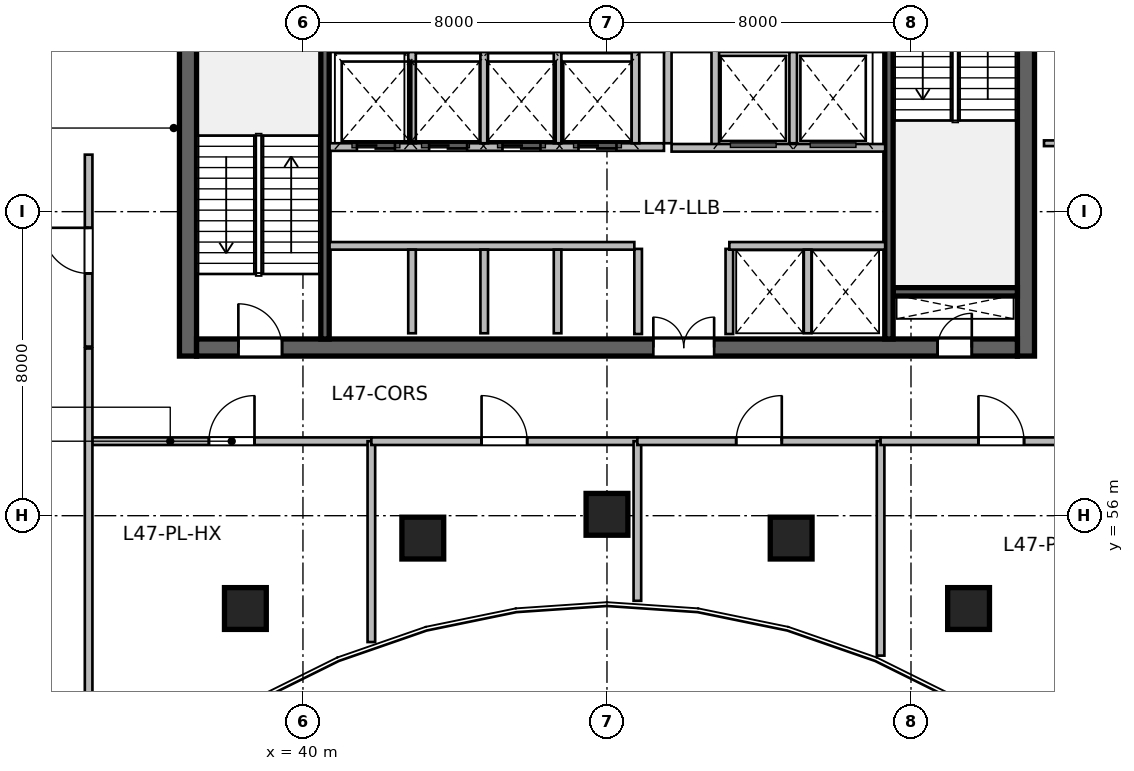
"""IFC4 building model, lengths in metres.
Left out: names, types, materials, properties, quantities, classifications, styles, units other than length and angle.
Written with IfcOpenShell. Run it as: python <this file> out.ifc"""

import sys

from ifc_helpers import new_model, si_unit, direction, frame, frame_2d, origin, origin_2d, place, context, subcontext, project, spatial, rectangle, circle, extrude, source, transform, mapped, element, fill, save


model = new_model("IFC4")
c1 = context("Model", 3, precision=1e-05, world=origin(), true_north=direction((0.0, 1.0)))
c2 = subcontext(c1, "Body", "Model", "MODEL_VIEW")
j1 = project(units=[si_unit("LENGTHUNIT", "METRE"), si_unit("PLANEANGLEUNIT", "RADIAN")], contexts=[c1])
p1 = place(None, origin())
s1 = spatial("IfcSite", under=j1, at=p1, CompositionType="ELEMENT")
p2 = place(p1, origin())
s2 = spatial("IfcBuilding", under=s1, at=p2, CompositionType="ELEMENT")
p3 = place(p2, frame((0.0, 0.0, 194.4)))
s3 = spatial("IfcBuildingStorey", under=s2, at=p3, CompositionType="ELEMENT", Elevation=194.4)
m1 = source(origin(), c2, "Body", "SweptSolid", [
    extrude(rectangle(XDim=12.0, YDim=0.45, at=frame_2d((6.0, 0.0))), origin(), (0.0, 0.0, 1.0), 4.8),
])
for number, where, z_axis, x_axis in (
    (1, (36.975, 60.2, 0.0), (0.0, 0.0, 1.0), (0.0, 1.0, 0.0)),
    (2, (59.025, 60.2, 0.0), (0.0, 0.0, 1.0), (0.0, 1.0, 0.0)),
):
    element("IfcWall", number, at=place(p3, frame(where, z_axis=z_axis, x_axis=x_axis)), inside=s3, PredefinedType="SHEAR", context=c2, shape_type="MappedRepresentation", body=[
        mapped(m1, transform((0.0, 0.0, 0.0), scale=1.0)),
    ])
m2 = source(origin(), c2, "Body", "SweptSolid", [
    extrude(rectangle(XDim=21.6, YDim=0.45, at=frame_2d((10.8, 0.0))), origin(), (0.0, 0.0, 1.0), 4.8),
])
p4 = place(p3, frame((37.2, 60.425, 0.0), z_axis=(0.0, 0.0, 1.0), x_axis=(1.0, 0.0, 0.0)))
e3 = element("IfcWall", 3, at=p4, inside=s3, PredefinedType="SHEAR", context=c2, shape_type="MappedRepresentation", body=[
    mapped(m2, transform((0.0, 0.0, 0.0), scale=1.0)),
])
p5 = place(p4, frame((1.1, 0.0, 0.0)))
e4 = element("IfcOpeningElement", 4, at=p5, cuts=e3, PredefinedType="OPENING", context=c2, shape_type="SweptSolid", body=[
    extrude(rectangle(XDim=1.15, YDim=2.15, at=frame_2d((0.575, 1.075))), frame((0.0, 0.235, 0.0), z_axis=(0.0, -1.0, 0.0), x_axis=(1.0, 0.0, 0.0)), (0.0, 0.0, 1.0), 0.47),
])
p6 = place(p4, frame((19.5, 0.0, 0.0)))
e5 = element("IfcOpeningElement", 5, at=p6, cuts=e3, PredefinedType="OPENING", context=c2, shape_type="SweptSolid", body=[
    extrude(rectangle(XDim=0.9, YDim=2.1, at=frame_2d((0.45, 1.05))), frame((0.0, 0.235, 0.0), z_axis=(0.0, -1.0, 0.0), x_axis=(1.0, 0.0, 0.0)), (0.0, 0.0, 1.0), 0.47),
])
p7 = place(p4, frame((12.02, 0.0, 0.0)))
e6 = element("IfcOpeningElement", 6, at=p7, cuts=e3, PredefinedType="OPENING", context=c2, shape_type="SweptSolid", body=[
    extrude(rectangle(XDim=1.6, YDim=2.15, at=frame_2d((0.8, 1.075))), frame((0.0, 0.235, 0.0), z_axis=(0.0, -1.0, 0.0), x_axis=(1.0, 0.0, 0.0)), (0.0, 0.0, 1.0), 0.47),
])
m3 = source(origin(), c2, "Body", "SweptSolid", [
    extrude(rectangle(XDim=3.27, YDim=0.22, at=frame_2d((1.635, 0.0))), origin(), (0.0, 0.0, 1.0), 4.8),
])
p8 = place(p3, frame((55.53, 61.89, 0.0), z_axis=(0.0, 0.0, 1.0), x_axis=(1.0, 0.0, 0.0)))
e7 = element("IfcWall", 7, at=p8, inside=s3, PredefinedType="SHEAR", context=c2, shape_type="MappedRepresentation", body=[
    mapped(m3, transform((0.0, 0.0, 0.0), scale=1.0)),
])
m4 = source(origin(), c2, "Body", "SweptSolid", [
    extrude(rectangle(XDim=11.1, YDim=0.22, at=frame_2d((5.55, 0.0))), origin(), (0.0, 0.0, 1.0), 4.8),
])
p9 = place(p3, frame((40.58, 60.65, 0.0), z_axis=(0.0, 0.0, 1.0), x_axis=(0.0, 1.0, 0.0)))
e8 = element("IfcWall", 8, at=p9, inside=s3, PredefinedType="SHEAR", context=c2, shape_type="MappedRepresentation", body=[
    mapped(m4, transform((0.0, 0.0, 0.0), scale=1.0)),
])
p10 = place(p3, frame((55.42, 60.65, 0.0), z_axis=(0.0, 0.0, 1.0), x_axis=(0.0, 1.0, 0.0)))
e9 = element("IfcWall", 9, at=p10, inside=s3, PredefinedType="SHEAR", context=c2, shape_type="MappedRepresentation", body=[
    mapped(m4, transform((0.0, 0.0, 0.0), scale=1.0)),
])
p11 = place(p10, frame((9.595, 0.0, 0.0)))
e10 = element("IfcOpeningElement", 10, at=p11, cuts=e9, PredefinedType="OPENING", context=c2, shape_type="SweptSolid", body=[
    extrude(rectangle(XDim=1.15, YDim=2.15, at=frame_2d((0.575, 1.075))), frame((0.0, 0.12, 0.0), z_axis=(0.0, -1.0, 0.0), x_axis=(1.0, 0.0, 0.0)), (0.0, 0.0, 1.0), 0.24),
])
m5 = source(origin(), c2, "Body", "SweptSolid", [
    extrude(circle(Radius=0.55, at=origin_2d()), origin(), (0.0, 0.0, 1.0), 4.8),
])
for number, where, z_axis, x_axis in (
    (11, (38.485, 53.558, 0.0), (0.0, 0.0, 1.0), (-0.289, 0.957, 0.0)),
    (12, (43.154, 55.411, 0.0), (0.0, 0.0, 1.0), (-0.143, 0.99, 0.0)),
    (13, (48.0, 56.036, 0.0), (0.0, 0.0, 1.0), (0.0, 1.0, 0.0)),
    (14, (52.846, 55.411, 0.0), (0.0, 0.0, 1.0), (0.143, 0.99, 0.0)),
    (15, (57.515, 53.558, 0.0), (0.0, 0.0, 1.0), (0.289, 0.957, 0.0)),
):
    element("IfcColumn", number, at=place(p3, frame(where, z_axis=z_axis, x_axis=x_axis)), inside=s3, PredefinedType="COLUMN", context=c2, shape_type="MappedRepresentation", body=[
        mapped(m5, transform((0.0, 0.0, 0.0), scale=1.0)),
    ])
m6 = source(origin(), c2, "Body", "SweptSolid", [
    extrude(rectangle(XDim=2.24, YDim=0.2, at=frame_2d((1.12, 0.0))), origin(), (0.0, 0.0, 1.0), 4.54),
])
for number, where, z_axis, x_axis in (
    (16, (48.82, 60.78, 0.0), (0.0, 0.0, 1.0), (0.0, 1.0, 0.0)),
    (17, (51.22, 60.78, 0.0), (0.0, 0.0, 1.0), (0.0, 1.0, 0.0)),
):
    element("IfcWall", number, at=place(p3, frame(where, z_axis=z_axis, x_axis=x_axis)), inside=s3, PredefinedType="SOLIDWALL", context=c2, shape_type="MappedRepresentation", body=[
        mapped(m6, transform((0.0, 0.0, 0.0), scale=1.0)),
    ])
m7 = source(origin(), c2, "Body", "SweptSolid", [
    extrude(rectangle(XDim=5.8, YDim=0.2, at=frame_2d((2.9, 0.0))), origin(), (0.0, 0.0, 1.0), 4.54),
])
p12 = place(p3, frame((49.6, 65.8, 0.0), z_axis=(0.0, 0.0, 1.0), x_axis=(0.0, 1.0, 0.0)))
e18 = element("IfcWall", 18, at=p12, inside=s3, PredefinedType="SOLIDWALL", context=c2, shape_type="MappedRepresentation", body=[
    mapped(m7, transform((0.0, 0.0, 0.0), scale=1.0)),
])
m8 = source(origin(), c2, "Body", "SweptSolid", [
    extrude(rectangle(XDim=2.58, YDim=0.2, at=frame_2d((1.29, 0.0))), origin(), (0.0, 0.0, 1.0), 4.54),
])
p13 = place(p3, frame((50.85, 65.68, 0.0), z_axis=(0.0, 0.0, 1.0), x_axis=(0.0, 1.0, 0.0)))
e19 = element("IfcWall", 19, at=p13, inside=s3, PredefinedType="SOLIDWALL", context=c2, shape_type="MappedRepresentation", body=[
    mapped(m8, transform((0.0, 0.0, 0.0), scale=1.0)),
])
m9 = source(origin(), c2, "Body", "SweptSolid", [
    extrude(rectangle(XDim=2.4, YDim=0.2, at=frame_2d((1.2, 0.0))), origin(), (0.0, 0.0, 1.0), 4.54),
])
p14 = place(p3, frame((52.9, 65.8, 0.0), z_axis=(0.0, 0.0, 1.0), x_axis=(0.0, 1.0, 0.0)))
e20 = element("IfcWall", 20, at=p14, inside=s3, PredefinedType="SOLIDWALL", context=c2, shape_type="MappedRepresentation", body=[
    mapped(m9, transform((0.0, 0.0, 0.0), scale=1.0)),
])
m10 = source(origin(), c2, "Body", "SweptSolid", [
    extrude(rectangle(XDim=5.62, YDim=0.2, at=frame_2d((2.81, 0.0))), origin(), (0.0, 0.0, 1.0), 4.54),
])
p15 = place(p3, frame((49.7, 65.68, 0.0), z_axis=(0.0, 0.0, 1.0), x_axis=(1.0, 0.0, 0.0)))
e21 = element("IfcWall", 21, at=p15, inside=s3, PredefinedType="SOLIDWALL", context=c2, shape_type="MappedRepresentation", body=[
    mapped(m10, transform((0.0, 0.0, 0.0), scale=1.0)),
])
m11 = source(origin(), c2, "Body", "SweptSolid", [
    extrude(rectangle(XDim=8.02, YDim=0.2, at=frame_2d((4.01, 0.0))), origin(), (0.0, 0.0, 1.0), 4.54),
])
p16 = place(p3, frame((40.7, 63.1, 0.0), z_axis=(0.0, 0.0, 1.0), x_axis=(1.0, 0.0, 0.0)))
e22 = element("IfcWall", 22, at=p16, inside=s3, PredefinedType="SOLIDWALL", context=c2, shape_type="MappedRepresentation", body=[
    mapped(m11, transform((0.0, 0.0, 0.0), scale=1.0)),
])
m12 = source(origin(), c2, "Body", "SweptSolid", [
    extrude(rectangle(XDim=4.1, YDim=0.2, at=frame_2d((2.05, 0.0))), origin(), (0.0, 0.0, 1.0), 4.54),
])
p17 = place(p3, frame((51.22, 63.1, 0.0), z_axis=(0.0, 0.0, 1.0), x_axis=(1.0, 0.0, 0.0)))
e23 = element("IfcWall", 23, at=p17, inside=s3, PredefinedType="SOLIDWALL", context=c2, shape_type="MappedRepresentation", body=[
    mapped(m12, transform((0.0, 0.0, 0.0), scale=1.0)),
])
m13 = source(origin(), c2, "Body", "SweptSolid", [
    extrude(rectangle(XDim=2.2, YDim=0.2, at=frame_2d((1.1, 0.0))), origin(), (0.0, 0.0, 1.0), 4.54),
])
for number, where, z_axis, x_axis in (
    (24, (42.87, 60.8, 0.0), (0.0, 0.0, 1.0), (0.0, 1.0, 0.0)),
    (25, (44.77, 60.8, 0.0), (0.0, 0.0, 1.0), (0.0, 1.0, 0.0)),
    (26, (46.7, 60.8, 0.0), (0.0, 0.0, 1.0), (0.0, 1.0, 0.0)),
    (27, (53.28, 60.8, 0.0), (0.0, 0.0, 1.0), (0.0, 1.0, 0.0)),
):
    element("IfcWall", number, at=place(p3, frame(where, z_axis=z_axis, x_axis=x_axis)), inside=s3, PredefinedType="SOLIDWALL", context=c2, shape_type="MappedRepresentation", body=[
        mapped(m13, transform((0.0, 0.0, 0.0), scale=1.0)),
    ])
m14 = source(origin(), c2, "Body", "SweptSolid", [
    extrude(rectangle(XDim=8.8, YDim=0.2, at=frame_2d((4.4, 0.0))), origin(), (0.0, 0.0, 1.0), 4.54),
])
p18 = place(p3, frame((40.7, 65.7, 0.0), z_axis=(0.0, 0.0, 1.0), x_axis=(1.0, 0.0, 0.0)))
e28 = element("IfcWall", 28, at=p18, inside=s3, PredefinedType="SOLIDWALL", context=c2, shape_type="MappedRepresentation", body=[
    mapped(m14, transform((0.0, 0.0, 0.0), scale=1.0)),
])
p19 = place(p18, frame((0.72, 0.0, 0.0)))
e29 = element("IfcOpeningElement", 29, at=p19, cuts=e28, PredefinedType="OPENING", context=c2, shape_type="SweptSolid", body=[
    extrude(rectangle(XDim=1.0, YDim=2.15, at=frame_2d((0.5, 1.075))), frame((0.0, 0.11, 0.0), z_axis=(0.0, -1.0, 0.0), x_axis=(1.0, 0.0, 0.0)), (0.0, 0.0, 1.0), 0.22),
])
p20 = place(p18, frame((2.62, 0.0, 0.0)))
e30 = element("IfcOpeningElement", 30, at=p20, cuts=e28, PredefinedType="OPENING", context=c2, shape_type="SweptSolid", body=[
    extrude(rectangle(XDim=1.0, YDim=2.15, at=frame_2d((0.5, 1.075))), frame((0.0, 0.11, 0.0), z_axis=(0.0, -1.0, 0.0), x_axis=(1.0, 0.0, 0.0)), (0.0, 0.0, 1.0), 0.22),
])
p21 = place(p18, frame((4.55, 0.0, 0.0)))
e31 = element("IfcOpeningElement", 31, at=p21, cuts=e28, PredefinedType="OPENING", context=c2, shape_type="SweptSolid", body=[
    extrude(rectangle(XDim=1.0, YDim=2.15, at=frame_2d((0.5, 1.075))), frame((0.0, 0.11, 0.0), z_axis=(0.0, -1.0, 0.0), x_axis=(1.0, 0.0, 0.0)), (0.0, 0.0, 1.0), 0.22),
])
p22 = place(p18, frame((6.55, 0.0, 0.0)))
e32 = element("IfcOpeningElement", 32, at=p22, cuts=e28, PredefinedType="OPENING", context=c2, shape_type="SweptSolid", body=[
    extrude(rectangle(XDim=1.0, YDim=2.15, at=frame_2d((0.5, 1.075))), frame((0.0, 0.11, 0.0), z_axis=(0.0, -1.0, 0.0), x_axis=(1.0, 0.0, 0.0)), (0.0, 0.0, 1.0), 0.22),
])
for number, where, z_axis, x_axis in (
    (33, (48.75, 65.8, 0.0), (0.0, 0.0, 1.0), (0.0, 1.0, 0.0)),
    (34, (42.87, 65.8, 0.0), (0.0, 0.0, 1.0), (0.0, 1.0, 0.0)),
    (35, (44.77, 65.8, 0.0), (0.0, 0.0, 1.0), (0.0, 1.0, 0.0)),
    (36, (46.7, 65.8, 0.0), (0.0, 0.0, 1.0), (0.0, 1.0, 0.0)),
):
    element("IfcWall", number, at=place(p3, frame(where, z_axis=z_axis, x_axis=x_axis)), inside=s3, PredefinedType="SOLIDWALL", context=c2, shape_type="MappedRepresentation", body=[
        mapped(m9, transform((0.0, 0.0, 0.0), scale=1.0)),
    ])
m15 = source(origin(), c2, "Body", "SweptSolid", [
    extrude(rectangle(XDim=2.1, YDim=0.15, at=frame_2d((1.05, 0.0))), origin(), (0.0, 0.0, 1.0), 4.54),
])
p23 = place(p3, frame((59.5, 65.8, 0.0), z_axis=(0.0, 0.0, 1.0), x_axis=(1.0, 0.0, 0.0)))
e37 = element("IfcWall", 37, at=p23, inside=s3, PredefinedType="PARTITIONING", context=c2, shape_type="MappedRepresentation", body=[
    mapped(m15, transform((0.0, 0.0, 0.0), scale=1.0)),
])
p24 = place(p23, frame((0.625, 0.0, 0.0)))
e38 = element("IfcOpeningElement", 38, at=p24, cuts=e37, PredefinedType="OPENING", context=c2, shape_type="SweptSolid", body=[
    extrude(rectangle(XDim=0.85, YDim=2.1, at=frame_2d((0.425, 1.05))), frame((0.0, 0.085, 0.0), z_axis=(0.0, -1.0, 0.0), x_axis=(1.0, 0.0, 0.0)), (0.0, 0.0, 1.0), 0.17),
])
m16 = source(origin(), c2, "Body", "SweptSolid", [
    extrude(rectangle(XDim=7.35, YDim=0.2, at=frame_2d((3.675, 0.0))), origin(), (0.0, 0.0, 1.0), 3.985),
])
p25 = place(p3, frame((34.45, 57.96, 0.0), z_axis=(0.0, 0.0, 1.0), x_axis=(1.0, 0.0, 0.0)))
e39 = element("IfcWall", 39, at=p25, inside=s3, PredefinedType="SOLIDWALL", context=c2, shape_type="MappedRepresentation", body=[
    mapped(m16, transform((0.0, 0.0, 0.0), scale=1.0)),
])
p26 = place(p25, frame((3.075, 0.0, 0.0)))
e40 = element("IfcOpeningElement", 40, at=p26, cuts=e39, PredefinedType="OPENING", context=c2, shape_type="SweptSolid", body=[
    extrude(rectangle(XDim=1.2, YDim=2.15, at=frame_2d((0.6, 1.075))), frame((0.0, 0.11, 0.0), z_axis=(0.0, -1.0, 0.0), x_axis=(1.0, 0.0, 0.0)), (0.0, 0.0, 1.0), 0.22),
])
m17 = source(origin(), c2, "Body", "SweptSolid", [
    extrude(rectangle(XDim=5.285, YDim=0.2, at=frame_2d((2.643, 0.0))), origin(), (0.0, 0.0, 1.0), 4.54),
])
p27 = place(p3, frame((41.8, 52.675, 0.0), z_axis=(0.0, 0.0, 1.0), x_axis=(0.0, 1.0, 0.0)))
e41 = element("IfcWall", 41, at=p27, inside=s3, PredefinedType="SOLIDWALL", context=c2, shape_type="MappedRepresentation", body=[
    mapped(m17, transform((0.0, 0.0, 0.0), scale=1.0)),
])
m18 = source(origin(), c2, "Body", "SweptSolid", [
    extrude(rectangle(XDim=7.0, YDim=0.2, at=frame_2d((3.5, 0.0))), origin(), (0.0, 0.0, 1.0), 4.54),
])
p28 = place(p3, frame((41.8, 57.96, 0.0), z_axis=(0.0, 0.0, 1.0), x_axis=(1.0, 0.0, 0.0)))
e42 = element("IfcWall", 42, at=p28, inside=s3, PredefinedType="SOLIDWALL", context=c2, shape_type="MappedRepresentation", body=[
    mapped(m18, transform((0.0, 0.0, 0.0), scale=1.0)),
])
p29 = place(p28, frame((2.9, 0.0, 0.0)))
e43 = element("IfcOpeningElement", 43, at=p29, cuts=e42, PredefinedType="OPENING", context=c2, shape_type="SweptSolid", body=[
    extrude(rectangle(XDim=1.2, YDim=2.15, at=frame_2d((0.6, 1.075))), frame((0.0, 0.11, 0.0), z_axis=(0.0, -1.0, 0.0), x_axis=(1.0, 0.0, 0.0)), (0.0, 0.0, 1.0), 0.22),
])
m19 = source(origin(), c2, "Body", "SweptSolid", [
    extrude(rectangle(XDim=4.2, YDim=0.2, at=frame_2d((2.1, 0.0))), origin(), (0.0, 0.0, 1.0), 4.54),
])
p30 = place(p3, frame((48.8, 53.76, 0.0), z_axis=(0.0, 0.0, 1.0), x_axis=(0.0, 1.0, 0.0)))
e44 = element("IfcWall", 44, at=p30, inside=s3, PredefinedType="SOLIDWALL", context=c2, shape_type="MappedRepresentation", body=[
    mapped(m19, transform((0.0, 0.0, 0.0), scale=1.0)),
])
m20 = source(origin(), c2, "Body", "SweptSolid", [
    extrude(rectangle(XDim=6.4, YDim=0.2, at=frame_2d((3.2, 0.0))), origin(), (0.0, 0.0, 1.0), 3.985),
])
p31 = place(p3, frame((48.8, 57.96, 0.0), z_axis=(0.0, 0.0, 1.0), x_axis=(1.0, 0.0, 0.0)))
e45 = element("IfcWall", 45, at=p31, inside=s3, PredefinedType="SOLIDWALL", context=c2, shape_type="MappedRepresentation", body=[
    mapped(m20, transform((0.0, 0.0, 0.0), scale=1.0)),
])
p32 = place(p31, frame((2.6, 0.0, 0.0)))
e46 = element("IfcOpeningElement", 46, at=p32, cuts=e45, PredefinedType="OPENING", context=c2, shape_type="SweptSolid", body=[
    extrude(rectangle(XDim=1.2, YDim=2.15, at=frame_2d((0.6, 1.075))), frame((0.0, 0.11, 0.0), z_axis=(0.0, -1.0, 0.0), x_axis=(1.0, 0.0, 0.0)), (0.0, 0.0, 1.0), 0.22),
])
m21 = source(origin(), c2, "Body", "SweptSolid", [
    extrude(rectangle(XDim=5.642, YDim=0.2, at=frame_2d((2.821, 0.0))), origin(), (0.0, 0.0, 1.0), 4.54),
])
p33 = place(p3, frame((55.2, 52.318, 0.0), z_axis=(0.0, 0.0, 1.0), x_axis=(0.0, 1.0, 0.0)))
e47 = element("IfcWall", 47, at=p33, inside=s3, PredefinedType="SOLIDWALL", context=c2, shape_type="MappedRepresentation", body=[
    mapped(m21, transform((0.0, 0.0, 0.0), scale=1.0)),
])
m22 = source(origin(), c2, "Body", "SweptSolid", [
    extrude(rectangle(XDim=6.35, YDim=0.2, at=frame_2d((3.175, 0.0))), origin(), (0.0, 0.0, 1.0), 4.54),
])
p34 = place(p3, frame((55.2, 57.96, 0.0), z_axis=(0.0, 0.0, 1.0), x_axis=(1.0, 0.0, 0.0)))
e48 = element("IfcWall", 48, at=p34, inside=s3, PredefinedType="SOLIDWALL", context=c2, shape_type="MappedRepresentation", body=[
    mapped(m22, transform((0.0, 0.0, 0.0), scale=1.0)),
])
p35 = place(p34, frame((2.575, 0.0, 0.0)))
e49 = element("IfcOpeningElement", 49, at=p35, cuts=e48, PredefinedType="OPENING", context=c2, shape_type="SweptSolid", body=[
    extrude(rectangle(XDim=1.2, YDim=2.15, at=frame_2d((0.6, 1.075))), frame((0.0, 0.11, 0.0), z_axis=(0.0, -1.0, 0.0), x_axis=(1.0, 0.0, 0.0)), (0.0, 0.0, 1.0), 0.22),
])
m23 = source(origin(), c2, "Body", "SweptSolid", [
    extrude(rectangle(XDim=12.336, YDim=0.2, at=frame_2d((6.168, 0.0))), origin(), (0.0, 0.0, 1.0), 4.54),
])
p36 = place(p3, frame((34.36, 48.064, 0.0), z_axis=(0.0, 0.0, 1.0), x_axis=(0.0, 1.0, 0.0)))
e50 = element("IfcWall", 50, at=p36, inside=s3, PredefinedType="SOLIDWALL", context=c2, shape_type="MappedRepresentation", body=[
    mapped(m23, transform((0.0, 0.0, 0.0), scale=1.0)),
])
m24 = source(origin(), c2, "Body", "SweptSolid", [
    extrude(rectangle(XDim=5.05, YDim=0.2, at=frame_2d((2.525, 0.0))), origin(), (0.0, 0.0, 1.0), 4.54),
])
p37 = place(p3, frame((34.36, 60.45, 0.0), z_axis=(0.0, 0.0, 1.0), x_axis=(0.0, 1.0, 0.0)))
e51 = element("IfcWall", 51, at=p37, inside=s3, PredefinedType="SOLIDWALL", context=c2, shape_type="MappedRepresentation", body=[
    mapped(m24, transform((0.0, 0.0, 0.0), scale=1.0)),
])
p38 = place(p37, frame((1.925, 0.0, 0.0)))
e52 = element("IfcOpeningElement", 52, at=p38, cuts=e51, PredefinedType="OPENING", context=c2, shape_type="SweptSolid", body=[
    extrude(rectangle(XDim=1.2, YDim=2.15, at=frame_2d((0.6, 1.075))), frame((0.0, 0.11, 0.0), z_axis=(0.0, -1.0, 0.0), x_axis=(1.0, 0.0, 0.0)), (0.0, 0.0, 1.0), 0.22),
])
m25 = source(origin(), c2, "Body", "SweptSolid", [
    extrude(rectangle(XDim=1.15, YDim=2.15, at=frame_2d((0.575, 1.075))), frame((0.0, 0.025, 0.0), z_axis=(0.0, -1.0, 0.0), x_axis=(1.0, 0.0, 0.0)), (0.0, 0.0, 1.0), 0.05),
])
p39 = place(p5, origin())
e53 = element("IfcDoor", 53, at=p39, inside=s3, OperationType="SINGLE_SWING_LEFT", PredefinedType="DOOR", context=c2, shape_type="MappedRepresentation", body=[
    mapped(m25, transform((0.0, 0.0, 0.0), scale=1.0)),
])
fill(e4, e53)
m26 = source(origin(), c2, "Body", "SweptSolid", [
    extrude(rectangle(XDim=0.9, YDim=2.1, at=frame_2d((0.45, 1.05))), frame((0.0, 0.025, 0.0), z_axis=(0.0, -1.0, 0.0), x_axis=(1.0, 0.0, 0.0)), (0.0, 0.0, 1.0), 0.05),
])
p40 = place(p6, origin())
e54 = element("IfcDoor", 54, at=p40, inside=s3, OperationType="SINGLE_SWING_RIGHT", PredefinedType="DOOR", context=c2, shape_type="MappedRepresentation", body=[
    mapped(m26, transform((0.0, 0.0, 0.0), scale=1.0)),
])
fill(e5, e54)
m27 = source(origin(), c2, "Body", "SweptSolid", [
    extrude(rectangle(XDim=1.6, YDim=2.15, at=frame_2d((0.8, 1.075))), frame((0.0, 0.025, 0.0), z_axis=(0.0, -1.0, 0.0), x_axis=(1.0, 0.0, 0.0)), (0.0, 0.0, 1.0), 0.05),
])
p41 = place(p7, origin())
e55 = element("IfcDoor", 55, at=p41, inside=s3, OperationType="DOUBLE_DOOR_SINGLE_SWING", PredefinedType="DOOR", context=c2, shape_type="MappedRepresentation", body=[
    mapped(m27, transform((0.0, 0.0, 0.0), scale=1.0)),
])
fill(e6, e55)
m28 = source(origin(), c2, "Body", "SweptSolid", [
    extrude(rectangle(XDim=1.0, YDim=2.15, at=frame_2d((0.5, 1.075))), frame((0.0, 0.025, 0.0), z_axis=(0.0, -1.0, 0.0), x_axis=(1.0, 0.0, 0.0)), (0.0, 0.0, 1.0), 0.05),
])
p42 = place(p19, origin())
e56 = element("IfcDoor", 56, at=p42, inside=s3, OperationType="DOUBLE_DOOR_SLIDING", PredefinedType="DOOR", context=c2, shape_type="MappedRepresentation", body=[
    mapped(m28, transform((0.0, 0.0, 0.0), scale=1.0)),
])
fill(e29, e56)
p43 = place(p20, origin())
e57 = element("IfcDoor", 57, at=p43, inside=s3, OperationType="DOUBLE_DOOR_SLIDING", PredefinedType="DOOR", context=c2, shape_type="MappedRepresentation", body=[
    mapped(m28, transform((0.0, 0.0, 0.0), scale=1.0)),
])
fill(e30, e57)
p44 = place(p21, origin())
e58 = element("IfcDoor", 58, at=p44, inside=s3, OperationType="DOUBLE_DOOR_SLIDING", PredefinedType="DOOR", context=c2, shape_type="MappedRepresentation", body=[
    mapped(m28, transform((0.0, 0.0, 0.0), scale=1.0)),
])
fill(e31, e58)
p45 = place(p22, origin())
e59 = element("IfcDoor", 59, at=p45, inside=s3, OperationType="DOUBLE_DOOR_SLIDING", PredefinedType="DOOR", context=c2, shape_type="MappedRepresentation", body=[
    mapped(m28, transform((0.0, 0.0, 0.0), scale=1.0)),
])
fill(e32, e59)
m29 = source(origin(), c2, "Body", "SweptSolid", [
    extrude(rectangle(XDim=1.2, YDim=2.15, at=frame_2d((0.6, 1.075))), frame((0.0, 0.025, 0.0), z_axis=(0.0, -1.0, 0.0), x_axis=(1.0, 0.0, 0.0)), (0.0, 0.0, 1.0), 0.05),
])
p46 = place(p26, origin())
e60 = element("IfcDoor", 60, at=p46, inside=s3, OperationType="SINGLE_SWING_RIGHT", PredefinedType="DOOR", context=c2, shape_type="MappedRepresentation", body=[
    mapped(m29, transform((0.0, 0.0, 0.0), scale=1.0)),
])
fill(e40, e60)
p47 = place(p29, origin())
e61 = element("IfcDoor", 61, at=p47, inside=s3, OperationType="SINGLE_SWING_LEFT", PredefinedType="DOOR", context=c2, shape_type="MappedRepresentation", body=[
    mapped(m29, transform((0.0, 0.0, 0.0), scale=1.0)),
])
fill(e43, e61)
p48 = place(p32, origin())
e62 = element("IfcDoor", 62, at=p48, inside=s3, OperationType="SINGLE_SWING_RIGHT", PredefinedType="DOOR", context=c2, shape_type="MappedRepresentation", body=[
    mapped(m29, transform((0.0, 0.0, 0.0), scale=1.0)),
])
fill(e46, e62)
p49 = place(p35, origin())
e63 = element("IfcDoor", 63, at=p49, inside=s3, OperationType="SINGLE_SWING_LEFT", PredefinedType="DOOR", context=c2, shape_type="MappedRepresentation", body=[
    mapped(m29, transform((0.0, 0.0, 0.0), scale=1.0)),
])
fill(e49, e63)
p50 = place(p38, origin())
e64 = element("IfcDoor", 64, at=p50, inside=s3, OperationType="SINGLE_SWING_RIGHT", PredefinedType="DOOR", context=c2, shape_type="MappedRepresentation", body=[
    mapped(m29, transform((0.0, 0.0, 0.0), scale=1.0)),
])
fill(e52, e64)
save(model, sys.argv[1])
